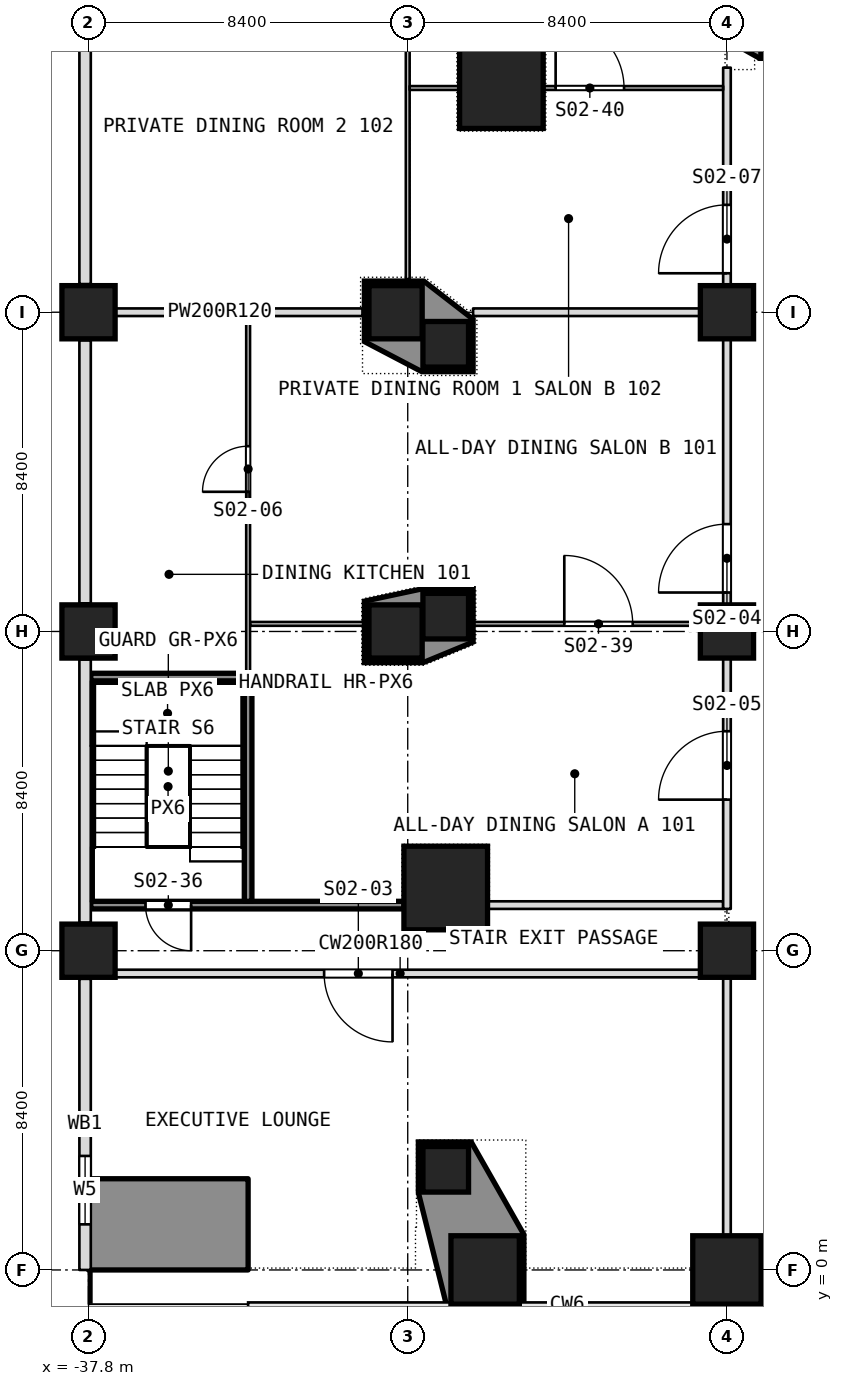
"""IFC4 building model, lengths in metres.
Left out: names, types, materials, properties, quantities, classifications, styles, units other than length and angle.
Written with IfcOpenShell. Run it as: python <this file> out.ifc"""

import sys

from ifc_helpers import new_model, si_unit, direction, frame, frame_2d, origin, origin_2d, place, context, subcontext, project, spatial, polyline, rectangle, outline, extrude, element, fill, save


model = new_model("IFC4")
c1 = context("Model", 3, precision=1e-05, world=origin(), true_north=direction((0.0, 1.0)))
c2 = subcontext(c1, "Body", "Model", "MODEL_VIEW")
j1 = project(units=[si_unit("LENGTHUNIT", "METRE"), si_unit("PLANEANGLEUNIT", "RADIAN")], contexts=[c1])
p1 = place(None, origin())
s1 = spatial("IfcSite", under=j1, at=p1, CompositionType="ELEMENT")
p2 = place(p1, origin())
s2 = spatial("IfcBuilding", under=s1, at=p2, CompositionType="ELEMENT")
p3 = place(p2, frame((0.0, 0.0, 8.0)))
s3 = spatial("IfcBuildingStorey", under=s2, at=p3, CompositionType="ELEMENT", Elevation=8.0)
p4 = place(p3, frame((-21.0, 0.0, 0.0), z_axis=(0.0, 0.0, 1.0), x_axis=(1.0, 0.0, 0.0)))
e1 = element("IfcColumn", 1, at=p4, inside=s3, PredefinedType="COLUMN", context=c2, shape_type="SweptSolid", body=[
    extrude(rectangle(XDim=1.8, YDim=1.8, at=origin_2d()), origin(), (0.0, 0.0, 1.0), 5.0),
])
for number, where, z_axis, x_axis in (
    (2, (-37.8, 8.4, 0.0), (0.0, 0.0, 1.0), (1.0, 0.0, 0.0)),
    (3, (-21.0, 8.4, 0.0), (0.0, 0.0, 1.0), (1.0, 0.0, 0.0)),
    (4, (-37.8, 16.8, 0.0), (0.0, 0.0, 1.0), (1.0, 0.0, 0.0)),
    (5, (-29.72, 16.8, 0.0), (0.0, 0.0, 1.0), (1.0, 0.0, 0.0)),
    (6, (-21.0, 16.8, 0.0), (0.0, 0.0, 1.0), (1.0, 0.0, 0.0)),
    (7, (-37.8, 25.2, 0.0), (0.0, 0.0, 1.0), (1.0, 0.0, 0.0)),
    (8, (-29.72, 25.2, 0.0), (0.0, 0.0, 1.0), (1.0, 0.0, 0.0)),
    (9, (-21.0, 25.2, 0.0), (0.0, 0.0, 1.0), (1.0, 0.0, 0.0)),
):
    element("IfcColumn", number, at=place(p3, frame(where, z_axis=z_axis, x_axis=x_axis)), inside=s3, PredefinedType="COLUMN", context=c2, shape_type="SweptSolid", body=[
        extrude(rectangle(XDim=1.4, YDim=1.4, at=origin_2d()), origin(), (0.0, 0.0, 1.0), 5.0),
    ])
p5 = place(p3, frame((-27.363, 0.0, 0.0), z_axis=(0.0, 0.0, 1.0), x_axis=(1.0, 0.0, 0.0)))
e10 = element("IfcColumn", 10, at=p5, inside=s3, PredefinedType="COLUMN", context=c2, shape_type="SweptSolid", body=[
    extrude(rectangle(XDim=1.8, YDim=1.8, at=origin_2d()), origin(), (0.0, 0.0, 1.0), 5.0),
])
for number, where, z_axis, x_axis in (
    (11, (-28.4, 10.05, 0.0), (0.0, 0.0, 1.0), (1.0, 0.0, 0.0)),
    (12, (-26.936, 31.135, 0.0), (0.0, 0.0, 1.0), (1.0, 0.0, 0.0)),
):
    element("IfcColumn", number, at=place(p3, frame(where, z_axis=z_axis, x_axis=x_axis)), inside=s3, PredefinedType="COLUMN", context=c2, shape_type="SweptSolid", body=[
        extrude(rectangle(XDim=2.2, YDim=2.2, at=origin_2d()), origin(), (0.0, 0.0, 1.0), 5.0),
    ])
p6 = place(p3, frame((-37.8, 1.2, 0.0), z_axis=(0.0, 0.0, 1.0), x_axis=(1.0, 0.0, 0.0)))
e13 = element("IfcWall", 13, at=p6, inside=s3, PredefinedType="SOLIDWALL", context=c2, shape_type="SweptSolid", body=[
    extrude(rectangle(XDim=4.2, YDim=2.4, at=frame_2d((2.1, 0.0))), origin(), (0.0, 0.0, 1.0), 5.0),
])
for number, where, z_axis, x_axis in (
    (14, (-28.4, 2.649, 0.0), (0.0, 0.0, 1.0), (1.0, 0.0, 0.0)),
    (15, (-28.4, 17.203, 0.0), (0.0, 0.0, 1.0), (1.0, 0.0, 0.0)),
    (16, (-28.4, 24.356, 0.0), (0.0, 0.0, 1.0), (1.0, 0.0, 0.0)),
    (17, (-19.507, 32.6, 0.0), (0.0, 0.0, 1.0), (1.0, 0.0, 0.0)),
):
    element("IfcColumn", number, at=place(p3, frame(where, z_axis=z_axis, x_axis=x_axis)), inside=s3, PredefinedType="COLUMN", context=c2, shape_type="SweptSolid", body=[
        extrude(rectangle(XDim=1.2, YDim=1.2, at=origin_2d()), origin(), (0.0, 0.0, 1.0), 5.0),
    ])
p7 = place(p3, frame((-38.1, 7.8, 0.0), z_axis=(0.0, 0.0, 1.0), x_axis=(1.0, 0.0, 0.0)))
e18 = element("IfcWall", 18, at=p7, inside=s3, PredefinedType="PARTITIONING", context=c2, shape_type="SweptSolid", body=[
    extrude(rectangle(XDim=17.0, YDim=0.2, at=frame_2d((8.5, 0.0))), origin(), (0.0, 0.0, 1.0), 4.68),
])
p8 = place(p7, frame((6.5, 0.0, 0.0)))
e19 = element("IfcOpeningElement", 19, at=p8, cuts=e18, PredefinedType="OPENING", context=c2, shape_type="SweptSolid", body=[
    extrude(rectangle(XDim=1.8, YDim=2.1, at=frame_2d((0.9, 1.05))), frame((0.0, 0.1, 0.0), z_axis=(0.0, -1.0, 0.0), x_axis=(1.0, 0.0, 0.0)), (0.0, 0.0, 1.0), 0.2),
])
p9 = place(p3, frame((-37.74, 9.6, 0.0), z_axis=(0.0, 0.0, 1.0), x_axis=(1.0, 0.0, 0.0)))
e20 = element("IfcWall", 20, at=p9, inside=s3, PredefinedType="PARTITIONING", context=c2, shape_type="SweptSolid", body=[
    extrude(rectangle(XDim=8.24, YDim=0.2, at=frame_2d((4.12, 0.0))), origin(), (0.0, 0.0, 1.0), 4.68),
])
p10 = place(p9, frame((1.44, 0.0, 0.0)))
e21 = element("IfcOpeningElement", 21, at=p10, cuts=e20, PredefinedType="OPENING", context=c2, shape_type="SweptSolid", body=[
    extrude(rectangle(XDim=1.2, YDim=2.1, at=frame_2d((0.6, 1.05))), frame((0.0, 0.1, 0.0), z_axis=(0.0, -1.0, 0.0), x_axis=(1.0, 0.0, 0.0)), (0.0, 0.0, 1.0), 0.2),
])
p11 = place(p3, frame((-27.3, 9.6, 0.0), z_axis=(0.0, 0.0, 1.0), x_axis=(1.0, 0.0, 0.0)))
e22 = element("IfcWall", 22, at=p11, inside=s3, PredefinedType="PARTITIONING", context=c2, shape_type="SweptSolid", body=[
    extrude(rectangle(XDim=6.2, YDim=0.2, at=frame_2d((3.1, 0.0))), origin(), (0.0, 0.0, 1.0), 4.68),
])
p12 = place(p3, frame((-37.74, 15.6, 0.0), z_axis=(0.0, 0.0, 1.0), x_axis=(1.0, 0.0, 0.0)))
e23 = element("IfcWall", 23, at=p12, inside=s3, PredefinedType="PARTITIONING", context=c2, shape_type="SweptSolid", body=[
    extrude(rectangle(XDim=4.04, YDim=0.2, at=frame_2d((2.02, 0.0))), origin(), (0.0, 0.0, 1.0), 4.68),
])
p13 = place(p3, frame((-33.55, 17.0, 0.0), z_axis=(0.0, 0.0, 1.0), x_axis=(1.0, 0.0, 0.0)))
e24 = element("IfcWall", 24, at=p13, inside=s3, PredefinedType="PARTITIONING", context=c2, shape_type="SweptSolid", body=[
    extrude(rectangle(XDim=2.99, YDim=0.1, at=frame_2d((1.495, 0.0))), origin(), (0.0, 0.0, 1.0), 4.68),
])
p14 = place(p3, frame((-27.66, 17.0, 0.0), z_axis=(0.0, 0.0, 1.0), x_axis=(1.0, 0.0, 0.0)))
e25 = element("IfcWall", 25, at=p14, inside=s3, PredefinedType="PARTITIONING", context=c2, shape_type="SweptSolid", body=[
    extrude(rectangle(XDim=6.56, YDim=0.1, at=frame_2d((3.28, 0.0))), origin(), (0.0, 0.0, 1.0), 4.68),
])
p15 = place(p14, frame((2.38, 0.0, 0.0)))
e26 = element("IfcOpeningElement", 26, at=p15, cuts=e25, PredefinedType="OPENING", context=c2, shape_type="SweptSolid", body=[
    extrude(rectangle(XDim=1.8, YDim=2.1, at=frame_2d((0.9, 1.05))), frame((0.0, 0.05, 0.0), z_axis=(0.0, -1.0, 0.0), x_axis=(1.0, 0.0, 0.0)), (0.0, 0.0, 1.0), 0.1),
])
p16 = place(p3, frame((-21.0, -0.894, 0.0), z_axis=(0.0, 0.0, 1.0), x_axis=(0.0, 1.0, 0.0)))
e27 = element("IfcWall", 27, at=p16, inside=s3, PredefinedType="PARTITIONING", context=c2, shape_type="SweptSolid", body=[
    extrude(rectangle(XDim=8.794, YDim=0.2, at=frame_2d((4.397, 0.0))), origin(), (0.0, 0.0, 1.0), 4.68),
])
p17 = place(p3, frame((-21.0, 9.5, 0.0), z_axis=(0.0, 0.0, 1.0), x_axis=(0.0, 1.0, 0.0)))
e28 = element("IfcWall", 28, at=p17, inside=s3, PredefinedType="PARTITIONING", context=c2, shape_type="SweptSolid", body=[
    extrude(rectangle(XDim=22.135, YDim=0.2, at=frame_2d((11.067, 0.0))), origin(), (0.0, 0.0, 1.0), 4.68),
])
p18 = place(p17, frame((8.325, 0.0, 0.0)))
e29 = element("IfcOpeningElement", 29, at=p18, cuts=e28, PredefinedType="OPENING", context=c2, shape_type="SweptSolid", body=[
    extrude(rectangle(XDim=1.8, YDim=2.1, at=frame_2d((0.9, 1.05))), frame((0.0, 0.1, 0.0), z_axis=(0.0, -1.0, 0.0), x_axis=(1.0, 0.0, 0.0)), (0.0, 0.0, 1.0), 0.2),
])
p19 = place(p17, frame((2.875, 0.0, 0.0)))
e30 = element("IfcOpeningElement", 30, at=p19, cuts=e28, PredefinedType="OPENING", context=c2, shape_type="SweptSolid", body=[
    extrude(rectangle(XDim=1.8, YDim=2.1, at=frame_2d((0.9, 1.05))), frame((0.0, 0.1, 0.0), z_axis=(0.0, -1.0, 0.0), x_axis=(1.0, 0.0, 0.0)), (0.0, 0.0, 1.0), 0.2),
])
p20 = place(p17, frame((16.725, 0.0, 0.0)))
e31 = element("IfcOpeningElement", 31, at=p20, cuts=e28, PredefinedType="OPENING", context=c2, shape_type="SweptSolid", body=[
    extrude(rectangle(XDim=1.8, YDim=2.1, at=frame_2d((0.9, 1.05))), frame((0.0, 0.1, 0.0), z_axis=(0.0, -1.0, 0.0), x_axis=(1.0, 0.0, 0.0)), (0.0, 0.0, 1.0), 0.2),
])
p21 = place(p3, frame((-38.1, 25.2, 0.0), z_axis=(0.0, 0.0, 1.0), x_axis=(1.0, 0.0, 0.0)))
e32 = element("IfcWall", 32, at=p21, inside=s3, PredefinedType="PARTITIONING", context=c2, shape_type="SweptSolid", body=[
    extrude(rectangle(XDim=7.51, YDim=0.2, at=frame_2d((3.755, 0.0))), origin(), (0.0, 0.0, 1.0), 4.68),
])
p22 = place(p3, frame((-27.68, 25.2, 0.0), z_axis=(0.0, 0.0, 1.0), x_axis=(1.0, 0.0, 0.0)))
e33 = element("IfcWall", 33, at=p22, inside=s3, PredefinedType="PARTITIONING", context=c2, shape_type="SweptSolid", body=[
    extrude(rectangle(XDim=6.58, YDim=0.2, at=frame_2d((3.29, 0.0))), origin(), (0.0, 0.0, 1.0), 4.68),
])
p23 = place(p3, frame((-29.4, 26.07, 0.0), z_axis=(0.0, 0.0, 1.0), x_axis=(0.0, 1.0, 0.0)))
e34 = element("IfcWall", 34, at=p23, inside=s3, PredefinedType="PARTITIONING", context=c2, shape_type="SweptSolid", body=[
    extrude(rectangle(XDim=16.23, YDim=0.1, at=frame_2d((8.115, 0.0))), origin(), (0.0, 0.0, 1.0), 4.68),
])
p24 = place(p23, frame((8.555, 0.0, 0.0)))
e35 = element("IfcOpeningElement", 35, at=p24, cuts=e34, PredefinedType="OPENING", context=c2, shape_type="SweptSolid", body=[
    extrude(rectangle(XDim=1.0, YDim=2.1, at=frame_2d((0.5, 1.05))), frame((0.0, 0.05, 0.0), z_axis=(0.0, -1.0, 0.0), x_axis=(1.0, 0.0, 0.0)), (0.0, 0.0, 1.0), 0.1),
])
p25 = place(p3, frame((-29.35, 31.1, 0.0), z_axis=(0.0, 0.0, 1.0), x_axis=(1.0, 0.0, 0.0)))
e36 = element("IfcWall", 36, at=p25, inside=s3, PredefinedType="PARTITIONING", context=c2, shape_type="SweptSolid", body=[
    extrude(rectangle(XDim=1.294, YDim=0.1, at=frame_2d((0.647, 0.0))), origin(), (0.0, 0.0, 1.0), 4.68),
])
p26 = place(p3, frame((-25.816, 31.1, 0.0), z_axis=(0.0, 0.0, 1.0), x_axis=(1.0, 0.0, 0.0)))
e37 = element("IfcWall", 37, at=p26, inside=s3, PredefinedType="PARTITIONING", context=c2, shape_type="SweptSolid", body=[
    extrude(rectangle(XDim=4.716, YDim=0.1, at=frame_2d((2.358, 0.0))), origin(), (0.0, 0.0, 1.0), 4.68),
])
p27 = place(p26, frame((0.308, 0.0, 0.0)))
e38 = element("IfcOpeningElement", 38, at=p27, cuts=e37, PredefinedType="OPENING", context=c2, shape_type="SweptSolid", body=[
    extrude(rectangle(XDim=1.8, YDim=2.1, at=frame_2d((0.9, 1.05))), frame((0.0, 0.05, 0.0), z_axis=(0.0, -1.0, 0.0), x_axis=(1.0, 0.0, 0.0)), (0.0, 0.0, 1.0), 0.1),
])
p28 = place(p3, frame((-33.6, 9.7, 0.0), z_axis=(0.0, 0.0, 1.0), x_axis=(0.0, 1.0, 0.0)))
e39 = element("IfcWall", 39, at=p28, inside=s3, PredefinedType="PARTITIONING", context=c2, shape_type="SweptSolid", body=[
    extrude(rectangle(XDim=6.0, YDim=0.2, at=frame_2d((3.0, 0.0))), origin(), (0.0, 0.0, 1.0), 4.68),
])
p29 = place(p3, frame((-33.6, 15.7, 0.0), z_axis=(0.0, 0.0, 1.0), x_axis=(0.0, 1.0, 0.0)))
e40 = element("IfcWall", 40, at=p29, inside=s3, PredefinedType="PARTITIONING", context=c2, shape_type="SweptSolid", body=[
    extrude(rectangle(XDim=9.4, YDim=0.1, at=frame_2d((4.7, 0.0))), origin(), (0.0, 0.0, 1.0), 4.68),
])
p30 = place(p29, frame((4.775, 0.0, 0.0)))
e41 = element("IfcOpeningElement", 41, at=p30, cuts=e40, PredefinedType="OPENING", context=c2, shape_type="SweptSolid", body=[
    extrude(rectangle(XDim=1.2, YDim=2.1, at=frame_2d((0.6, 1.05))), frame((0.0, 0.05, 0.0), z_axis=(0.0, -1.0, 0.0), x_axis=(1.0, 0.0, 0.0)), (0.0, 0.0, 1.0), 0.1),
])
p31 = place(p3, frame((-37.89, 32.86, 0.0), z_axis=(0.0, 0.0, 1.0), x_axis=(0.0, -1.0, 0.0)))
e42 = element("IfcWall", 42, at=p31, inside=s3, PredefinedType="NOTDEFINED", context=c2, shape_type="SweptSolid", body=[
    extrude(rectangle(XDim=6.92, YDim=0.3, at=frame_2d((3.46, 0.0))), origin(), (0.0, 0.0, 1.0), 3.78),
])
p32 = place(p3, frame((-37.89, 24.46, 0.0), z_axis=(0.0, 0.0, 1.0), x_axis=(0.0, -1.0, 0.0)))
e43 = element("IfcWall", 43, at=p32, inside=s3, PredefinedType="NOTDEFINED", context=c2, shape_type="SweptSolid", body=[
    extrude(rectangle(XDim=6.92, YDim=0.3, at=frame_2d((3.46, 0.0))), origin(), (0.0, 0.0, 1.0), 3.78),
])
p33 = place(p3, frame((-37.89, 16.06, 0.0), z_axis=(0.0, 0.0, 1.0), x_axis=(0.0, -1.0, 0.0)))
e44 = element("IfcWall", 44, at=p33, inside=s3, PredefinedType="NOTDEFINED", context=c2, shape_type="SweptSolid", body=[
    extrude(rectangle(XDim=6.92, YDim=0.3, at=frame_2d((3.46, 0.0))), origin(), (0.0, 0.0, 1.0), 5.0),
])
p34 = place(p3, frame((-37.89, 7.66, 0.0), z_axis=(0.0, 0.0, 1.0), x_axis=(0.0, -1.0, 0.0)))
e45 = element("IfcWall", 45, at=p34, inside=s3, PredefinedType="NOTDEFINED", context=c2, shape_type="SweptSolid", body=[
    extrude(rectangle(XDim=7.66, YDim=0.3, at=frame_2d((3.83, 0.0))), origin(), (0.0, 0.0, 1.0), 3.78),
])
p35 = place(p34, frame((4.66, 0.0, 1.2)))
e46 = element("IfcOpeningElement", 46, at=p35, cuts=e45, PredefinedType="OPENING", context=c2, shape_type="SweptSolid", body=[
    extrude(rectangle(XDim=1.8, YDim=2.4, at=frame_2d((0.9, 1.2))), frame((0.0, 0.15, 0.0), z_axis=(0.0, -1.0, 0.0), x_axis=(1.0, 0.0, 0.0)), (0.0, 0.0, 1.0), 0.3),
])
p36 = place(p3, origin())
e47 = element("IfcWall", 47, at=p36, inside=s3, PredefinedType="SOLIDWALL", context=c2, shape_type="SweptSolid", body=[
    extrude(outline(polyline([(-29.12, 2.034), (-29.12, 3.369), (-27.73, 3.369), (-26.343, 0.932), (-26.343, -1.02), (-28.357, -1.02), (-29.12, 2.034)]), holes=[polyline([(-28.263, -0.9), (-26.463, -0.9), (-26.463, 0.9), (-28.263, 0.9), (-28.263, -0.9)]), polyline([(-29.0, 2.049), (-27.8, 2.049), (-27.8, 3.249), (-29.0, 3.249), (-29.0, 2.049)])]), origin(), (0.0, 0.0, 1.0), 5.0),
])
p37 = place(p3, origin())
e48 = element("IfcWall", 48, at=p37, inside=s3, PredefinedType="SOLIDWALL", context=c2, shape_type="SweptSolid", body=[
    extrude(outline(polyline([(-30.54, 17.597), (-29.013, 17.923), (-27.68, 17.923), (-27.68, 16.523), (-28.996, 15.98), (-30.54, 15.98), (-30.54, 17.597)]), holes=[polyline([(-29.0, 16.603), (-27.8, 16.603), (-27.8, 17.803), (-29.0, 17.803), (-29.0, 16.603)]), polyline([(-30.42, 16.1), (-29.02, 16.1), (-29.02, 17.5), (-30.42, 17.5), (-30.42, 16.1)])]), origin(), (0.0, 0.0, 1.0), 5.0),
])
p38 = place(p3, origin())
e49 = element("IfcWall", 49, at=p38, inside=s3, PredefinedType="SOLIDWALL", context=c2, shape_type="SweptSolid", body=[
    extrude(outline(polyline([(-30.54, 24.427), (-30.54, 26.02), (-28.979, 26.02), (-27.68, 25.015), (-27.68, 23.636), (-29.03, 23.636), (-30.54, 24.427)]), holes=[polyline([(-29.0, 23.756), (-27.8, 23.756), (-27.8, 24.956), (-29.0, 24.956), (-29.0, 23.756)]), polyline([(-30.42, 24.5), (-29.02, 24.5), (-29.02, 25.9), (-30.42, 25.9), (-30.42, 24.5)])]), origin(), (0.0, 0.0, 1.0), 5.0),
])
p39 = place(p3, origin())
e50 = element("IfcWall", 50, at=p39, inside=s3, PredefinedType="SOLIDWALL", context=c2, shape_type="SweptSolid", body=[
    extrude(outline(polyline([(-21.82, 34.42), (-20.258, 34.42), (-18.787, 33.258), (-18.787, 31.88), (-20.138, 31.88), (-21.82, 32.83), (-21.82, 34.42)]), holes=[polyline([(-18.907, 32.0), (-18.907, 33.2), (-20.107, 33.2), (-20.107, 32.0), (-18.907, 32.0)]), polyline([(-20.3, 32.9), (-20.3, 34.3), (-21.7, 34.3), (-21.7, 32.9), (-20.3, 32.9)])]), origin(), (0.0, 0.0, 1.0), 5.0),
])
p40 = place(p8, origin())
e51 = element("IfcDoor", 51, at=p40, inside=s3, OperationType="DOUBLE_DOOR_SINGLE_SWING", PredefinedType="DOOR", context=c2, shape_type="SweptSolid", body=[
    extrude(rectangle(XDim=1.8, YDim=2.1, at=frame_2d((0.9, 1.05))), frame((0.0, 0.025, 0.0), z_axis=(0.0, -1.0, 0.0), x_axis=(1.0, 0.0, 0.0)), (0.0, 0.0, 1.0), 0.05),
])
fill(e19, e51)
p41 = place(p10, origin())
e52 = element("IfcDoor", 52, at=p41, inside=s3, OperationType="SINGLE_SWING_RIGHT", PredefinedType="DOOR", context=c2, shape_type="SweptSolid", body=[
    extrude(rectangle(XDim=1.2, YDim=2.1, at=frame_2d((0.6, 1.05))), frame((0.0, 0.025, 0.0), z_axis=(0.0, -1.0, 0.0), x_axis=(1.0, 0.0, 0.0)), (0.0, 0.0, 1.0), 0.05),
])
fill(e21, e52)
p42 = place(p15, origin())
e53 = element("IfcDoor", 53, at=p42, inside=s3, OperationType="DOUBLE_DOOR_SINGLE_SWING", PredefinedType="DOOR", context=c2, shape_type="SweptSolid", body=[
    extrude(rectangle(XDim=1.8, YDim=2.1, at=frame_2d((0.9, 1.05))), frame((0.0, 0.025, 0.0), z_axis=(0.0, -1.0, 0.0), x_axis=(1.0, 0.0, 0.0)), (0.0, 0.0, 1.0), 0.05),
])
fill(e26, e53)
p43 = place(p18, origin())
e54 = element("IfcDoor", 54, at=p43, inside=s3, OperationType="DOUBLE_DOOR_SINGLE_SWING", PredefinedType="DOOR", context=c2, shape_type="SweptSolid", body=[
    extrude(rectangle(XDim=1.8, YDim=2.1, at=frame_2d((0.9, 1.05))), frame((0.0, 0.025, 0.0), z_axis=(0.0, -1.0, 0.0), x_axis=(1.0, 0.0, 0.0)), (0.0, 0.0, 1.0), 0.05),
])
fill(e29, e54)
p44 = place(p19, origin())
e55 = element("IfcDoor", 55, at=p44, inside=s3, OperationType="DOUBLE_DOOR_SINGLE_SWING", PredefinedType="DOOR", context=c2, shape_type="SweptSolid", body=[
    extrude(rectangle(XDim=1.8, YDim=2.1, at=frame_2d((0.9, 1.05))), frame((0.0, 0.025, 0.0), z_axis=(0.0, -1.0, 0.0), x_axis=(1.0, 0.0, 0.0)), (0.0, 0.0, 1.0), 0.05),
])
fill(e30, e55)
p45 = place(p20, origin())
e56 = element("IfcDoor", 56, at=p45, inside=s3, OperationType="DOUBLE_DOOR_SINGLE_SWING", PredefinedType="DOOR", context=c2, shape_type="SweptSolid", body=[
    extrude(rectangle(XDim=1.8, YDim=2.1, at=frame_2d((0.9, 1.05))), frame((0.0, 0.025, 0.0), z_axis=(0.0, -1.0, 0.0), x_axis=(1.0, 0.0, 0.0)), (0.0, 0.0, 1.0), 0.05),
])
fill(e31, e56)
p46 = place(p27, origin())
e57 = element("IfcDoor", 57, at=p46, inside=s3, OperationType="DOUBLE_DOOR_SINGLE_SWING", PredefinedType="DOOR", context=c2, shape_type="SweptSolid", body=[
    extrude(rectangle(XDim=1.8, YDim=2.1, at=frame_2d((0.9, 1.05))), frame((0.0, 0.025, 0.0), z_axis=(0.0, -1.0, 0.0), x_axis=(1.0, 0.0, 0.0)), (0.0, 0.0, 1.0), 0.05),
])
fill(e38, e57)
p47 = place(p30, origin())
e58 = element("IfcDoor", 58, at=p47, inside=s3, OperationType="SINGLE_SWING_LEFT", PredefinedType="DOOR", context=c2, shape_type="SweptSolid", body=[
    extrude(rectangle(XDim=1.2, YDim=2.1, at=frame_2d((0.6, 1.05))), frame((0.0, 0.025, 0.0), z_axis=(0.0, -1.0, 0.0), x_axis=(1.0, 0.0, 0.0)), (0.0, 0.0, 1.0), 0.05),
])
fill(e41, e58)
p48 = place(p35, origin())
e59 = element("IfcWindow", 59, at=p48, inside=s3, PartitioningType="SINGLE_PANEL", PredefinedType="WINDOW", context=c2, shape_type="SweptSolid", body=[
    extrude(rectangle(XDim=1.8, YDim=2.4, at=frame_2d((0.9, 1.2))), frame((0.0, 0.03, 0.0), z_axis=(0.0, -1.0, 0.0), x_axis=(1.0, 0.0, 0.0)), (0.0, 0.0, 1.0), 0.06),
])
fill(e46, e59)
save(model, sys.argv[1])
